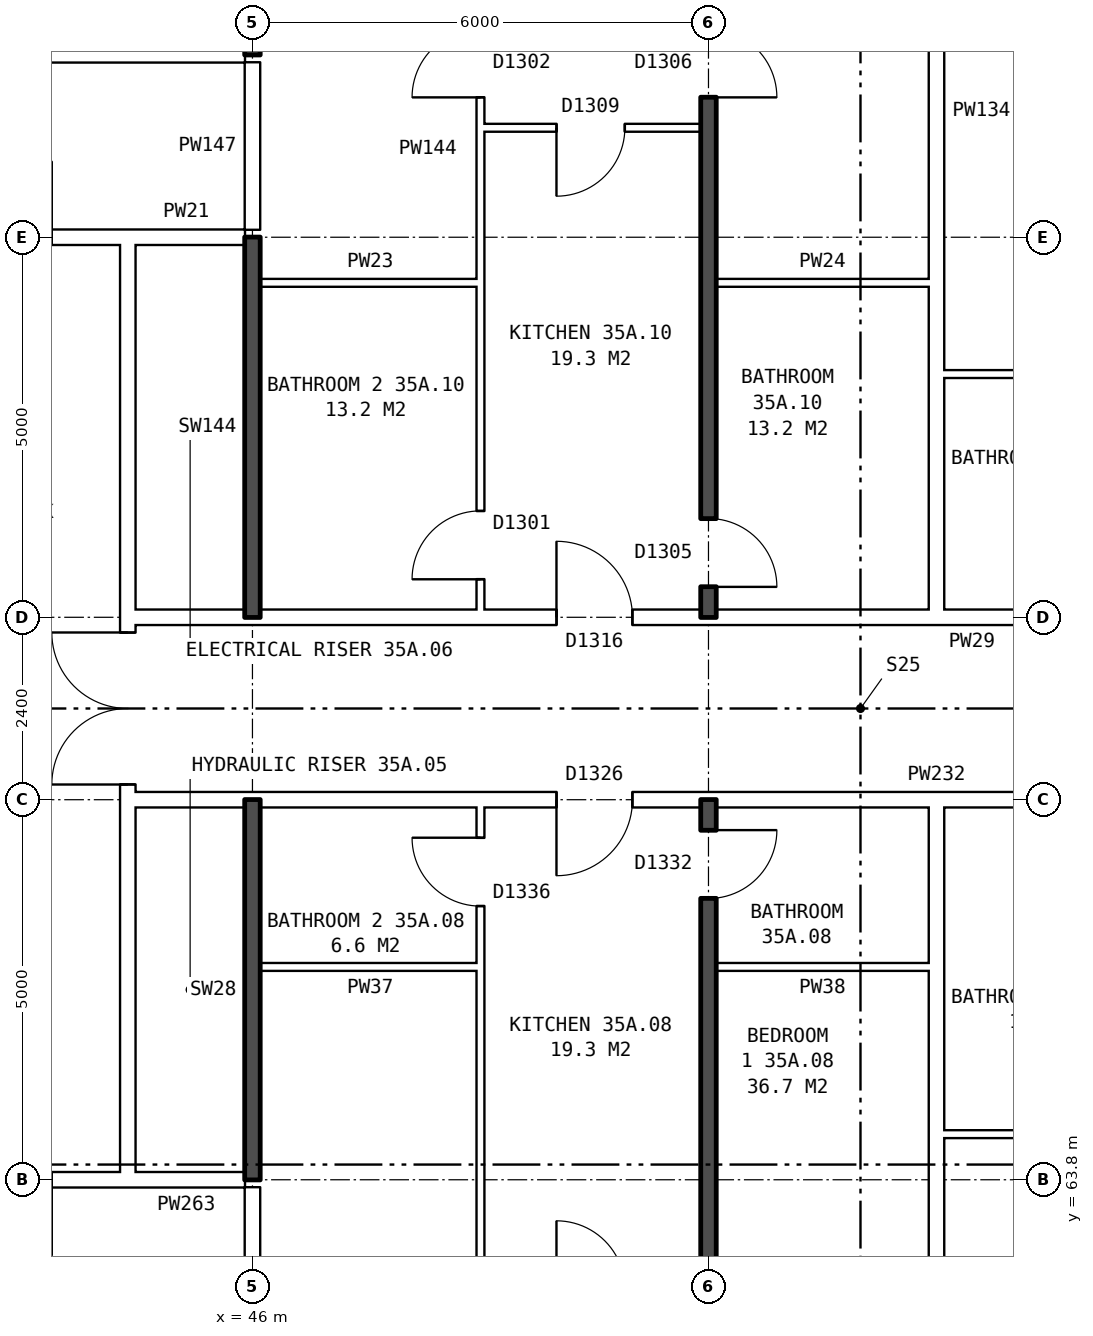
"""IFC4 building model, lengths in metres.
Left out: names, types, materials, properties, quantities, classifications, styles, units other than length and angle.
Written with IfcOpenShell. Run it as: python <this file> out.ifc"""

import sys

from ifc_helpers import new_model, si_unit, direction, frame, frame_2d, origin, place, context, subcontext, project, spatial, rectangle, extrude, element, fill, save


model = new_model("IFC4")
c1 = context("Model", 3, precision=1e-05, world=origin(), true_north=direction((0.0, 1.0)))
c2 = subcontext(c1, "Body", "Model", "MODEL_VIEW")
j1 = project(units=[si_unit("LENGTHUNIT", "METRE"), si_unit("PLANEANGLEUNIT", "RADIAN")], contexts=[c1])
p1 = place(None, origin())
s1 = spatial("IfcSite", under=j1, at=p1, CompositionType="ELEMENT")
p2 = place(p1, origin())
s2 = spatial("IfcBuilding", under=s1, at=p2, CompositionType="ELEMENT")
p3 = place(p2, frame((0.0, 0.0, 126.8)))
s3 = spatial("IfcBuildingStorey", under=s2, at=p3, CompositionType="ELEMENT", Elevation=126.8)
p4 = place(p3, frame((44.36, 63.9, 0.0), z_axis=(0.0, 0.0, 1.0), x_axis=(0.0, 1.0, 0.0)))
e1 = element("IfcWall", 1, at=p4, inside=s3, PredefinedType="PARTITIONING", context=c2, shape_type="SweptSolid", body=[
    extrude(rectangle(XDim=12.2, YDim=0.2, at=frame_2d((6.1, 0.0))), origin(), (0.0, 0.0, 1.0), 2.85),
])
p5 = place(p4, frame((5.1, 0.0, 0.0)))
e2 = element("IfcOpeningElement", 2, at=p5, cuts=e1, PredefinedType="OPENING", context=c2, shape_type="SweptSolid", body=[
    extrude(rectangle(XDim=2.0, YDim=2.1, at=frame_2d((1.0, 1.05))), frame((0.0, 0.11, 0.0), z_axis=(0.0, -1.0, 0.0), x_axis=(1.0, 0.0, 0.0)), (0.0, 0.0, 1.0), 0.22),
])
p6 = place(p3, frame((41.36, 63.8, 0.0), z_axis=(0.0, 0.0, 1.0), x_axis=(1.0, 0.0, 0.0)))
e3 = element("IfcWall", 3, at=p6, inside=s3, PredefinedType="PARTITIONING", context=c2, shape_type="SweptSolid", body=[
    extrude(rectangle(XDim=3.0, YDim=0.2, at=frame_2d((1.5, 0.0))), origin(), (0.0, 0.0, 1.0), 2.85),
])
p7 = place(p6, frame((1.0, 0.0, 0.0)))
e4 = element("IfcOpeningElement", 4, at=p7, cuts=e3, PredefinedType="OPENING", context=c2, shape_type="SweptSolid", body=[
    extrude(rectangle(XDim=1.0, YDim=2.1, at=frame_2d((0.5, 1.05))), frame((0.0, 0.11, 0.0), z_axis=(0.0, -1.0, 0.0), x_axis=(1.0, 0.0, 0.0)), (0.0, 0.0, 1.0), 0.22),
])
p8 = place(p3, frame((44.36, 63.8, 0.0), z_axis=(0.0, 0.0, 1.0), x_axis=(1.0, 0.0, 0.0)))
e5 = element("IfcWall", 5, at=p8, inside=s3, PredefinedType="PARTITIONING", context=c2, shape_type="SweptSolid", body=[
    extrude(rectangle(XDim=1.54, YDim=0.2, at=frame_2d((0.77, 0.0))), origin(), (0.0, 0.0, 1.0), 2.85),
])
p9 = place(p3, frame((55.1, 64.4, 0.0), z_axis=(0.0, 0.0, 1.0), x_axis=(1.0, 0.0, 0.0)))
e6 = element("IfcWall", 6, at=p9, inside=s3, PredefinedType="PARTITIONING", context=c2, shape_type="SweptSolid", body=[
    extrude(rectangle(XDim=2.8, YDim=0.1, at=frame_2d((1.4, 0.0))), origin(), (0.0, 0.0, 1.0), 2.85),
])
p10 = place(p3, frame((46.1, 66.6, 0.0), z_axis=(0.0, 0.0, 1.0), x_axis=(1.0, 0.0, 0.0)))
e7 = element("IfcWall", 7, at=p10, inside=s3, PredefinedType="PARTITIONING", context=c2, shape_type="SweptSolid", body=[
    extrude(rectangle(XDim=2.9, YDim=0.1, at=frame_2d((1.45, 0.0))), origin(), (0.0, 0.0, 1.0), 2.85),
])
p11 = place(p3, frame((52.1, 66.6, 0.0), z_axis=(0.0, 0.0, 1.0), x_axis=(1.0, 0.0, 0.0)))
e8 = element("IfcWall", 8, at=p11, inside=s3, PredefinedType="PARTITIONING", context=c2, shape_type="SweptSolid", body=[
    extrude(rectangle(XDim=2.8, YDim=0.1, at=frame_2d((1.4, 0.0))), origin(), (0.0, 0.0, 1.0), 2.85),
])
p12 = place(p3, frame((44.36, 68.8, 0.0), z_axis=(0.0, 0.0, 1.0), x_axis=(1.0, 0.0, 0.0)))
e9 = element("IfcWall", 9, at=p12, inside=s3, PredefinedType="PARTITIONING", context=c2, shape_type="SweptSolid", body=[
    extrude(rectangle(XDim=19.28, YDim=0.2, at=frame_2d((9.64, 0.0))), origin(), (0.0, 0.0, 1.0), 2.85),
])
p13 = place(p12, frame((14.64, 0.0, 0.0)))
e10 = element("IfcOpeningElement", 10, at=p13, cuts=e9, PredefinedType="OPENING", context=c2, shape_type="SweptSolid", body=[
    extrude(rectangle(XDim=1.0, YDim=2.1, at=frame_2d((0.5, 1.05))), frame((0.0, 0.11, 0.0), z_axis=(0.0, -1.0, 0.0), x_axis=(1.0, 0.0, 0.0)), (0.0, 0.0, 1.0), 0.22),
])
p14 = place(p12, frame((5.64, 0.0, 0.0)))
e11 = element("IfcOpeningElement", 11, at=p14, cuts=e9, PredefinedType="OPENING", context=c2, shape_type="SweptSolid", body=[
    extrude(rectangle(XDim=1.0, YDim=2.1, at=frame_2d((0.5, 1.05))), frame((0.0, 0.11, 0.0), z_axis=(0.0, -1.0, 0.0), x_axis=(1.0, 0.0, 0.0)), (0.0, 0.0, 1.0), 0.22),
])
p15 = place(p3, frame((44.36, 71.2, 0.0), z_axis=(0.0, 0.0, 1.0), x_axis=(1.0, 0.0, 0.0)))
e12 = element("IfcWall", 12, at=p15, inside=s3, PredefinedType="PARTITIONING", context=c2, shape_type="SweptSolid", body=[
    extrude(rectangle(XDim=19.28, YDim=0.2, at=frame_2d((9.64, 0.0))), origin(), (0.0, 0.0, 1.0), 2.85),
])
p16 = place(p15, frame((14.64, 0.0, 0.0)))
e13 = element("IfcOpeningElement", 13, at=p16, cuts=e12, PredefinedType="OPENING", context=c2, shape_type="SweptSolid", body=[
    extrude(rectangle(XDim=1.0, YDim=2.1, at=frame_2d((0.5, 1.05))), frame((0.0, 0.11, 0.0), z_axis=(0.0, -1.0, 0.0), x_axis=(1.0, 0.0, 0.0)), (0.0, 0.0, 1.0), 0.22),
])
p17 = place(p15, frame((5.64, 0.0, 0.0)))
e14 = element("IfcOpeningElement", 14, at=p17, cuts=e12, PredefinedType="OPENING", context=c2, shape_type="SweptSolid", body=[
    extrude(rectangle(XDim=1.0, YDim=2.1, at=frame_2d((0.5, 1.05))), frame((0.0, 0.11, 0.0), z_axis=(0.0, -1.0, 0.0), x_axis=(1.0, 0.0, 0.0)), (0.0, 0.0, 1.0), 0.22),
])
p18 = place(p3, frame((55.1, 74.4, 0.0), z_axis=(0.0, 0.0, 1.0), x_axis=(1.0, 0.0, 0.0)))
e15 = element("IfcWall", 15, at=p18, inside=s3, PredefinedType="PARTITIONING", context=c2, shape_type="SweptSolid", body=[
    extrude(rectangle(XDim=2.8, YDim=0.1, at=frame_2d((1.4, 0.0))), origin(), (0.0, 0.0, 1.0), 2.85),
])
p19 = place(p3, frame((46.1, 75.6, 0.0), z_axis=(0.0, 0.0, 1.0), x_axis=(1.0, 0.0, 0.0)))
e16 = element("IfcWall", 16, at=p19, inside=s3, PredefinedType="PARTITIONING", context=c2, shape_type="SweptSolid", body=[
    extrude(rectangle(XDim=2.9, YDim=0.1, at=frame_2d((1.45, 0.0))), origin(), (0.0, 0.0, 1.0), 2.85),
])
p20 = place(p3, frame((52.1, 75.6, 0.0), z_axis=(0.0, 0.0, 1.0), x_axis=(1.0, 0.0, 0.0)))
e17 = element("IfcWall", 17, at=p20, inside=s3, PredefinedType="PARTITIONING", context=c2, shape_type="SweptSolid", body=[
    extrude(rectangle(XDim=2.8, YDim=0.1, at=frame_2d((1.4, 0.0))), origin(), (0.0, 0.0, 1.0), 2.85),
])
p21 = place(p3, frame((41.36, 76.2, 0.0), z_axis=(0.0, 0.0, 1.0), x_axis=(1.0, 0.0, 0.0)))
e18 = element("IfcWall", 18, at=p21, inside=s3, PredefinedType="PARTITIONING", context=c2, shape_type="SweptSolid", body=[
    extrude(rectangle(XDim=3.0, YDim=0.2, at=frame_2d((1.5, 0.0))), origin(), (0.0, 0.0, 1.0), 2.85),
])
p22 = place(p21, frame((1.0, 0.0, 0.0)))
e19 = element("IfcOpeningElement", 19, at=p22, cuts=e18, PredefinedType="OPENING", context=c2, shape_type="SweptSolid", body=[
    extrude(rectangle(XDim=1.0, YDim=2.1, at=frame_2d((0.5, 1.05))), frame((0.0, 0.11, 0.0), z_axis=(0.0, -1.0, 0.0), x_axis=(1.0, 0.0, 0.0)), (0.0, 0.0, 1.0), 0.22),
])
p23 = place(p3, frame((44.36, 76.2, 0.0), z_axis=(0.0, 0.0, 1.0), x_axis=(1.0, 0.0, 0.0)))
e20 = element("IfcWall", 20, at=p23, inside=s3, PredefinedType="PARTITIONING", context=c2, shape_type="SweptSolid", body=[
    extrude(rectangle(XDim=1.54, YDim=0.2, at=frame_2d((0.77, 0.0))), origin(), (0.0, 0.0, 1.0), 2.85),
])
p24 = place(p3, frame((49.0, 77.64, 0.0), z_axis=(0.0, 0.0, 1.0), x_axis=(1.0, 0.0, 0.0)))
e21 = element("IfcWall", 21, at=p24, inside=s3, PredefinedType="PARTITIONING", context=c2, shape_type="SweptSolid", body=[
    extrude(rectangle(XDim=2.9, YDim=0.1, at=frame_2d((1.45, 0.0))), origin(), (0.0, 0.0, 1.0), 2.85),
])
p25 = place(p24, frame((1.0, 0.0, 0.0)))
e22 = element("IfcOpeningElement", 22, at=p25, cuts=e21, PredefinedType="OPENING", context=c2, shape_type="SweptSolid", body=[
    extrude(rectangle(XDim=0.9, YDim=2.1, at=frame_2d((0.45, 1.05))), frame((0.0, 0.06, 0.0), z_axis=(0.0, -1.0, 0.0), x_axis=(1.0, 0.0, 0.0)), (0.0, 0.0, 1.0), 0.12),
])
p26 = place(p3, frame((27.11, 78.6, 0.0), z_axis=(0.0, 0.0, 1.0), x_axis=(1.0, 0.0, 0.0)))
e23 = element("IfcWall", 23, at=p26, inside=s3, PredefinedType="PARTITIONING", context=c2, shape_type="SweptSolid", body=[
    extrude(rectangle(XDim=18.79, YDim=0.2, at=frame_2d((9.395, 0.0))), origin(), (0.0, 0.0, 1.0), 2.85),
])
p27 = place(p26, frame((14.19, 0.0, 0.0)))
e24 = element("IfcOpeningElement", 24, at=p27, cuts=e23, PredefinedType="OPENING", context=c2, shape_type="SweptSolid", body=[
    extrude(rectangle(XDim=1.0, YDim=2.1, at=frame_2d((0.5, 1.05))), frame((0.0, 0.11, 0.0), z_axis=(0.0, -1.0, 0.0), x_axis=(1.0, 0.0, 0.0)), (0.0, 0.0, 1.0), 0.22),
])
p28 = place(p26, frame((10.39, 0.0, 0.0)))
e25 = element("IfcOpeningElement", 25, at=p28, cuts=e23, PredefinedType="OPENING", context=c2, shape_type="SweptSolid", body=[
    extrude(rectangle(XDim=1.0, YDim=2.1, at=frame_2d((0.5, 1.05))), frame((0.0, 0.11, 0.0), z_axis=(0.0, -1.0, 0.0), x_axis=(1.0, 0.0, 0.0)), (0.0, 0.0, 1.0), 0.22),
])
p29 = place(p26, frame((4.59, 0.0, 0.0)))
e26 = element("IfcOpeningElement", 26, at=p29, cuts=e23, PredefinedType="OPENING", context=c2, shape_type="SweptSolid", body=[
    extrude(rectangle(XDim=1.0, YDim=2.1, at=frame_2d((0.5, 1.05))), frame((0.0, 0.11, 0.0), z_axis=(0.0, -1.0, 0.0), x_axis=(1.0, 0.0, 0.0)), (0.0, 0.0, 1.0), 0.22),
])
p30 = place(p3, frame((46.0, 61.5, 0.0), z_axis=(0.0, 0.0, 1.0), x_axis=(0.0, 1.0, 0.0)))
e27 = element("IfcWall", 27, at=p30, inside=s3, PredefinedType="PARTITIONING", context=c2, shape_type="SweptSolid", body=[
    extrude(rectangle(XDim=2.2, YDim=0.2, at=frame_2d((1.1, 0.0))), origin(), (0.0, 0.0, 1.0), 2.85),
])
for number, where, z_axis, x_axis in (
    (28, (46.0, 63.8, 0.0), (0.0, 0.0, 1.0), (0.0, 1.0, 0.0)),
    (29, (46.0, 71.2, 0.0), (0.0, 0.0, 1.0), (0.0, 1.0, 0.0)),
):
    element("IfcWall", number, at=place(p3, frame(where, z_axis=z_axis, x_axis=x_axis)), inside=s3, PredefinedType="SOLIDWALL", context=c2, shape_type="SweptSolid", body=[
        extrude(rectangle(XDim=5.0, YDim=0.2, at=frame_2d((2.5, 0.0))), origin(), (0.0, 0.0, 1.0), 2.85),
    ])
p31 = place(p3, frame((46.0, 76.3, 0.0), z_axis=(0.0, 0.0, 1.0), x_axis=(0.0, 1.0, 0.0)))
e30 = element("IfcWall", 30, at=p31, inside=s3, PredefinedType="PARTITIONING", context=c2, shape_type="SweptSolid", body=[
    extrude(rectangle(XDim=2.2, YDim=0.2, at=frame_2d((1.1, 0.0))), origin(), (0.0, 0.0, 1.0), 2.85),
])
p32 = place(p3, frame((46.0, 78.6, 0.0), z_axis=(0.0, 0.0, 1.0), x_axis=(0.0, 1.0, 0.0)))
e31 = element("IfcWall", 31, at=p32, inside=s3, PredefinedType="SOLIDWALL", context=c2, shape_type="SweptSolid", body=[
    extrude(rectangle(XDim=7.04, YDim=0.2, at=frame_2d((3.52, 0.0))), origin(), (0.0, 0.0, 1.0), 2.85),
])
p33 = place(p3, frame((49.0, 54.36, 0.0), z_axis=(0.0, 0.0, 1.0), x_axis=(0.0, 1.0, 0.0)))
e32 = element("IfcWall", 32, at=p33, inside=s3, PredefinedType="PARTITIONING", context=c2, shape_type="SweptSolid", body=[
    extrude(rectangle(XDim=14.34, YDim=0.1, at=frame_2d((7.17, 0.0))), origin(), (0.0, 0.0, 1.0), 2.85),
])
p34 = place(p33, frame((6.7, 0.0, 0.0)))
e33 = element("IfcOpeningElement", 33, at=p34, cuts=e32, PredefinedType="OPENING", context=c2, shape_type="SweptSolid", body=[
    extrude(rectangle(XDim=0.9, YDim=2.1, at=frame_2d((0.45, 1.05))), frame((0.0, 0.06, 0.0), z_axis=(0.0, -1.0, 0.0), x_axis=(1.0, 0.0, 0.0)), (0.0, 0.0, 1.0), 0.12),
])
p35 = place(p33, frame((13.04, 0.0, 0.0)))
e34 = element("IfcOpeningElement", 34, at=p35, cuts=e32, PredefinedType="OPENING", context=c2, shape_type="SweptSolid", body=[
    extrude(rectangle(XDim=0.9, YDim=2.1, at=frame_2d((0.45, 1.05))), frame((0.0, 0.06, 0.0), z_axis=(0.0, -1.0, 0.0), x_axis=(1.0, 0.0, 0.0)), (0.0, 0.0, 1.0), 0.12),
])
p36 = place(p3, frame((49.0, 71.3, 0.0), z_axis=(0.0, 0.0, 1.0), x_axis=(0.0, 1.0, 0.0)))
e35 = element("IfcWall", 35, at=p36, inside=s3, PredefinedType="PARTITIONING", context=c2, shape_type="SweptSolid", body=[
    extrude(rectangle(XDim=14.34, YDim=0.1, at=frame_2d((7.17, 0.0))), origin(), (0.0, 0.0, 1.0), 2.85),
])
p37 = place(p36, frame((6.74, 0.0, 0.0)))
e36 = element("IfcOpeningElement", 36, at=p37, cuts=e35, PredefinedType="OPENING", context=c2, shape_type="SweptSolid", body=[
    extrude(rectangle(XDim=0.9, YDim=2.1, at=frame_2d((0.45, 1.05))), frame((0.0, 0.06, 0.0), z_axis=(0.0, -1.0, 0.0), x_axis=(1.0, 0.0, 0.0)), (0.0, 0.0, 1.0), 0.12),
])
p38 = place(p36, frame((0.4, 0.0, 0.0)))
e37 = element("IfcOpeningElement", 37, at=p38, cuts=e35, PredefinedType="OPENING", context=c2, shape_type="SweptSolid", body=[
    extrude(rectangle(XDim=0.9, YDim=2.1, at=frame_2d((0.45, 1.05))), frame((0.0, 0.06, 0.0), z_axis=(0.0, -1.0, 0.0), x_axis=(1.0, 0.0, 0.0)), (0.0, 0.0, 1.0), 0.12),
])
p39 = place(p3, frame((52.0, 54.36, 0.0), z_axis=(0.0, 0.0, 1.0), x_axis=(0.0, 1.0, 0.0)))
e38 = element("IfcWall", 38, at=p39, inside=s3, PredefinedType="SOLIDWALL", context=c2, shape_type="SweptSolid", body=[
    extrude(rectangle(XDim=14.44, YDim=0.2, at=frame_2d((7.22, 0.0))), origin(), (0.0, 0.0, 1.0), 2.85),
])
p40 = place(p39, frame((6.7, 0.0, 0.0)))
e39 = element("IfcOpeningElement", 39, at=p40, cuts=e38, PredefinedType="OPENING", context=c2, shape_type="SweptSolid", body=[
    extrude(rectangle(XDim=0.9, YDim=2.1, at=frame_2d((0.45, 1.05))), frame((0.0, 0.11, 0.0), z_axis=(0.0, -1.0, 0.0), x_axis=(1.0, 0.0, 0.0)), (0.0, 0.0, 1.0), 0.22),
])
p41 = place(p39, frame((13.14, 0.0, 0.0)))
e40 = element("IfcOpeningElement", 40, at=p41, cuts=e38, PredefinedType="OPENING", context=c2, shape_type="SweptSolid", body=[
    extrude(rectangle(XDim=0.9, YDim=2.1, at=frame_2d((0.45, 1.05))), frame((0.0, 0.11, 0.0), z_axis=(0.0, -1.0, 0.0), x_axis=(1.0, 0.0, 0.0)), (0.0, 0.0, 1.0), 0.22),
])
p42 = place(p3, frame((52.0, 71.2, 0.0), z_axis=(0.0, 0.0, 1.0), x_axis=(0.0, 1.0, 0.0)))
e41 = element("IfcWall", 41, at=p42, inside=s3, PredefinedType="SOLIDWALL", context=c2, shape_type="SweptSolid", body=[
    extrude(rectangle(XDim=14.44, YDim=0.2, at=frame_2d((7.22, 0.0))), origin(), (0.0, 0.0, 1.0), 2.85),
])
p43 = place(p42, frame((6.84, 0.0, 0.0)))
e42 = element("IfcOpeningElement", 42, at=p43, cuts=e41, PredefinedType="OPENING", context=c2, shape_type="SweptSolid", body=[
    extrude(rectangle(XDim=0.9, YDim=2.1, at=frame_2d((0.45, 1.05))), frame((0.0, 0.11, 0.0), z_axis=(0.0, -1.0, 0.0), x_axis=(1.0, 0.0, 0.0)), (0.0, 0.0, 1.0), 0.22),
])
p44 = place(p42, frame((0.4, 0.0, 0.0)))
e43 = element("IfcOpeningElement", 43, at=p44, cuts=e41, PredefinedType="OPENING", context=c2, shape_type="SweptSolid", body=[
    extrude(rectangle(XDim=0.9, YDim=2.1, at=frame_2d((0.45, 1.05))), frame((0.0, 0.11, 0.0), z_axis=(0.0, -1.0, 0.0), x_axis=(1.0, 0.0, 0.0)), (0.0, 0.0, 1.0), 0.22),
])
for number, where, z_axis, x_axis in (
    (44, (55.0, 54.36, 0.0), (0.0, 0.0, 1.0), (0.0, 1.0, 0.0)),
    (45, (55.0, 71.3, 0.0), (0.0, 0.0, 1.0), (0.0, 1.0, 0.0)),
):
    element("IfcWall", number, at=place(p3, frame(where, z_axis=z_axis, x_axis=x_axis)), inside=s3, PredefinedType="PARTITIONING", context=c2, shape_type="SweptSolid", body=[
        extrude(rectangle(XDim=14.34, YDim=0.2, at=frame_2d((7.17, 0.0))), origin(), (0.0, 0.0, 1.0), 2.85),
    ])
p45 = place(p5, origin())
e46 = element("IfcDoor", 46, at=p45, inside=s3, OperationType="DOUBLE_DOOR_SINGLE_SWING", PredefinedType="DOOR", context=c2, shape_type="SweptSolid", body=[
    extrude(rectangle(XDim=2.0, YDim=2.1, at=frame_2d((1.0, 1.05))), frame((0.0, 0.025, 0.0), z_axis=(0.0, -1.0, 0.0), x_axis=(1.0, 0.0, 0.0)), (0.0, 0.0, 1.0), 0.05),
])
fill(e2, e46)
p46 = place(p14, frame((1.0, 0.0, 0.0), z_axis=(0.0, 0.0, 1.0), x_axis=(-1.0, 0.0, 0.0)))
e47 = element("IfcDoor", 47, at=p46, inside=s3, OperationType="SINGLE_SWING_RIGHT", PredefinedType="DOOR", context=c2, shape_type="SweptSolid", body=[
    extrude(rectangle(XDim=1.0, YDim=2.1, at=frame_2d((0.5, 1.05))), frame((0.0, 0.025, 0.0), z_axis=(0.0, -1.0, 0.0), x_axis=(1.0, 0.0, 0.0)), (0.0, 0.0, 1.0), 0.05),
])
fill(e11, e47)
p47 = place(p41, frame((0.9, 0.0, 0.0), z_axis=(0.0, 0.0, 1.0), x_axis=(-1.0, 0.0, 0.0)))
e48 = element("IfcDoor", 48, at=p47, inside=s3, OperationType="SINGLE_SWING_LEFT", PredefinedType="DOOR", context=c2, shape_type="SweptSolid", body=[
    extrude(rectangle(XDim=0.9, YDim=2.1, at=frame_2d((0.45, 1.05))), frame((0.0, 0.025, 0.0), z_axis=(0.0, -1.0, 0.0), x_axis=(1.0, 0.0, 0.0)), (0.0, 0.0, 1.0), 0.05),
])
fill(e40, e48)
p48 = place(p35, origin())
e49 = element("IfcDoor", 49, at=p48, inside=s3, OperationType="SINGLE_SWING_RIGHT", PredefinedType="DOOR", context=c2, shape_type="SweptSolid", body=[
    extrude(rectangle(XDim=0.9, YDim=2.1, at=frame_2d((0.45, 1.05))), frame((0.0, 0.025, 0.0), z_axis=(0.0, -1.0, 0.0), x_axis=(1.0, 0.0, 0.0)), (0.0, 0.0, 1.0), 0.05),
])
fill(e34, e49)
p49 = place(p43, frame((0.9, 0.0, 0.0), z_axis=(0.0, 0.0, 1.0), x_axis=(-1.0, 0.0, 0.0)))
e50 = element("IfcDoor", 50, at=p49, inside=s3, OperationType="SINGLE_SWING_RIGHT", PredefinedType="DOOR", context=c2, shape_type="SweptSolid", body=[
    extrude(rectangle(XDim=0.9, YDim=2.1, at=frame_2d((0.45, 1.05))), frame((0.0, 0.025, 0.0), z_axis=(0.0, -1.0, 0.0), x_axis=(1.0, 0.0, 0.0)), (0.0, 0.0, 1.0), 0.05),
])
fill(e42, e50)
p50 = place(p37, origin())
e51 = element("IfcDoor", 51, at=p50, inside=s3, OperationType="SINGLE_SWING_LEFT", PredefinedType="DOOR", context=c2, shape_type="SweptSolid", body=[
    extrude(rectangle(XDim=0.9, YDim=2.1, at=frame_2d((0.45, 1.05))), frame((0.0, 0.025, 0.0), z_axis=(0.0, -1.0, 0.0), x_axis=(1.0, 0.0, 0.0)), (0.0, 0.0, 1.0), 0.05),
])
fill(e36, e51)
p51 = place(p17, origin())
e52 = element("IfcDoor", 52, at=p51, inside=s3, OperationType="SINGLE_SWING_LEFT", PredefinedType="DOOR", context=c2, shape_type="SweptSolid", body=[
    extrude(rectangle(XDim=1.0, YDim=2.1, at=frame_2d((0.5, 1.05))), frame((0.0, 0.025, 0.0), z_axis=(0.0, -1.0, 0.0), x_axis=(1.0, 0.0, 0.0)), (0.0, 0.0, 1.0), 0.05),
])
fill(e14, e52)
p52 = place(p25, frame((0.9, 0.0, 0.0), z_axis=(0.0, 0.0, 1.0), x_axis=(-1.0, 0.0, 0.0)))
e53 = element("IfcDoor", 53, at=p52, inside=s3, OperationType="SINGLE_SWING_RIGHT", PredefinedType="DOOR", context=c2, shape_type="SweptSolid", body=[
    extrude(rectangle(XDim=0.9, YDim=2.1, at=frame_2d((0.45, 1.05))), frame((0.0, 0.025, 0.0), z_axis=(0.0, -1.0, 0.0), x_axis=(1.0, 0.0, 0.0)), (0.0, 0.0, 1.0), 0.05),
])
fill(e22, e53)
p53 = place(p44, frame((0.9, 0.0, 0.0), z_axis=(0.0, 0.0, 1.0), x_axis=(-1.0, 0.0, 0.0)))
e54 = element("IfcDoor", 54, at=p53, inside=s3, OperationType="SINGLE_SWING_RIGHT", PredefinedType="DOOR", context=c2, shape_type="SweptSolid", body=[
    extrude(rectangle(XDim=0.9, YDim=2.1, at=frame_2d((0.45, 1.05))), frame((0.0, 0.025, 0.0), z_axis=(0.0, -1.0, 0.0), x_axis=(1.0, 0.0, 0.0)), (0.0, 0.0, 1.0), 0.05),
])
fill(e43, e54)
p54 = place(p38, origin())
e55 = element("IfcDoor", 55, at=p54, inside=s3, OperationType="SINGLE_SWING_LEFT", PredefinedType="DOOR", context=c2, shape_type="SweptSolid", body=[
    extrude(rectangle(XDim=0.9, YDim=2.1, at=frame_2d((0.45, 1.05))), frame((0.0, 0.025, 0.0), z_axis=(0.0, -1.0, 0.0), x_axis=(1.0, 0.0, 0.0)), (0.0, 0.0, 1.0), 0.05),
])
fill(e37, e55)
save(model, sys.argv[1])
